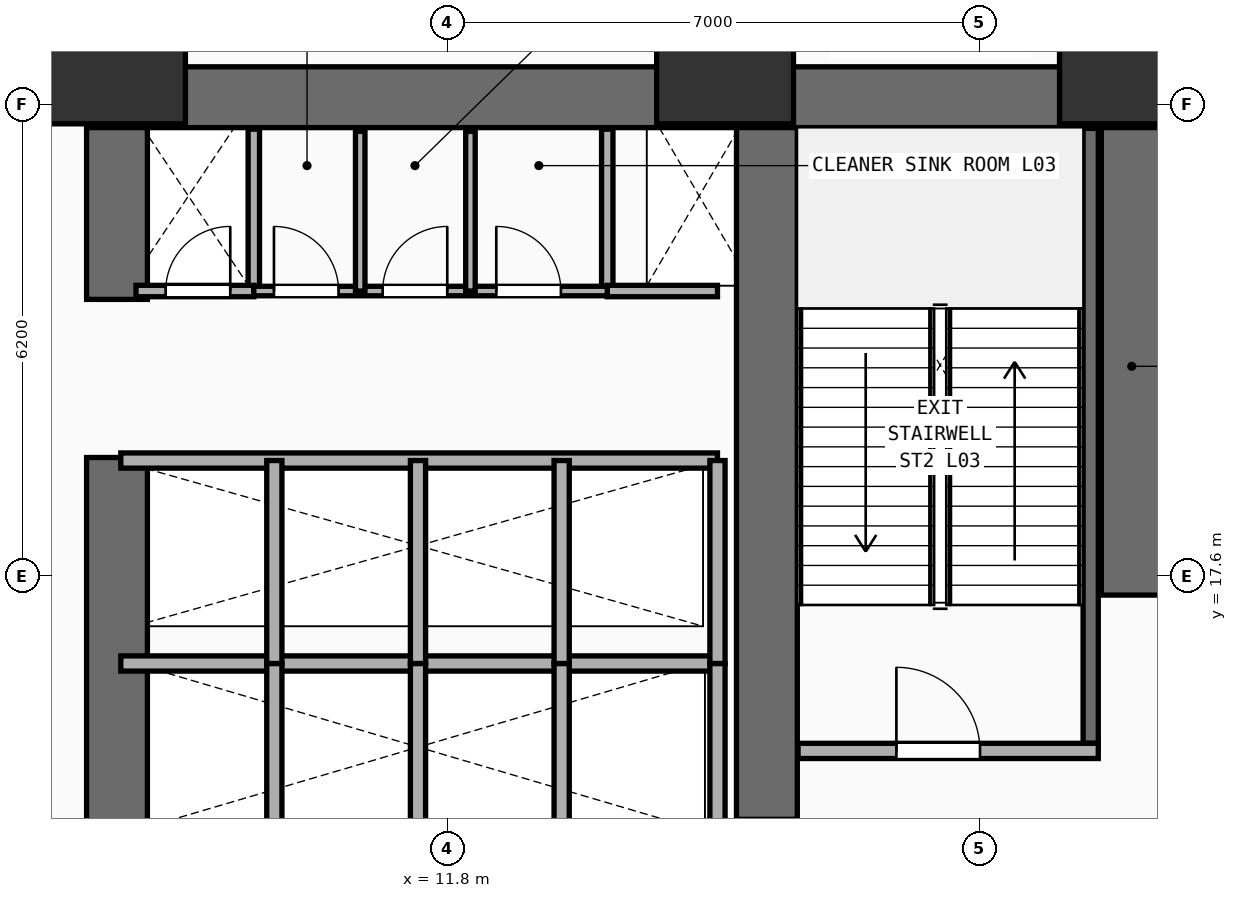
"""IFC4 building model, lengths in metres.
Left out: names, types, materials, properties, quantities, classifications, styles, units other than length and angle.
Written with IfcOpenShell. Run it as: python <this file> out.ifc"""

import sys

from ifc_helpers import new_model, si_unit, direction, frame, frame_2d, origin, origin_2d, place, context, subcontext, project, spatial, rectangle, extrude, element, fill, save


model = new_model("IFC4")
c1 = context("Model", 3, precision=1e-05, world=origin(), true_north=direction((0.0, 1.0)))
c2 = subcontext(c1, "Body", "Model", "MODEL_VIEW")
j1 = project(units=[si_unit("LENGTHUNIT", "METRE"), si_unit("PLANEANGLEUNIT", "RADIAN")], contexts=[c1])
p1 = place(None, origin())
s1 = spatial("IfcSite", under=j1, at=p1, CompositionType="ELEMENT")
p2 = place(p1, origin())
s2 = spatial("IfcBuilding", under=s1, at=p2, CompositionType="ELEMENT")
p3 = place(p2, frame((0.0, 0.0, 10.4)))
s3 = spatial("IfcBuildingStorey", under=s2, at=p3, CompositionType="ELEMENT", Elevation=10.4)
p4 = place(p3, frame((7.05, 23.9, 0.0), z_axis=(0.0, 0.0, 1.0), x_axis=(1.0, 0.0, 0.0)))
e1 = element("IfcWall", 1, at=p4, inside=s3, PredefinedType="SHEAR", context=c2, shape_type="SweptSolid", body=[
    extrude(rectangle(XDim=14.15, YDim=0.8, at=frame_2d((7.075, 0.0))), origin(), (0.0, 0.0, 1.0), 4.46),
])
p5 = place(p3, frame((7.45, 14.35, 0.0), z_axis=(0.0, 0.0, 1.0), x_axis=(0.0, 1.0, 0.0)))
e2 = element("IfcWall", 2, at=p5, inside=s3, PredefinedType="SHEAR", context=c2, shape_type="SweptSolid", body=[
    extrude(rectangle(XDim=4.81, YDim=0.8, at=frame_2d((2.405, 0.0))), origin(), (0.0, 0.0, 1.0), 4.46),
])
p6 = place(p3, frame((7.45, 21.24, 0.0), z_axis=(0.0, 0.0, 1.0), x_axis=(0.0, 1.0, 0.0)))
e3 = element("IfcWall", 3, at=p6, inside=s3, PredefinedType="SHEAR", context=c2, shape_type="SweptSolid", body=[
    extrude(rectangle(XDim=2.26, YDim=0.8, at=frame_2d((1.13, 0.0))), origin(), (0.0, 0.0, 1.0), 4.46),
])
p7 = place(p3, frame((20.8, 17.35, 0.0), z_axis=(0.0, 0.0, 1.0), x_axis=(0.0, 1.0, 0.0)))
e4 = element("IfcWall", 4, at=p7, inside=s3, PredefinedType="SHEAR", context=c2, shape_type="SweptSolid", body=[
    extrude(rectangle(XDim=6.15, YDim=0.8, at=frame_2d((3.075, 0.0))), origin(), (0.0, 0.0, 1.0), 4.46),
])
p8 = place(p3, frame((16.0, 14.4, 0.0), z_axis=(0.0, 0.0, 1.0), x_axis=(0.0, 1.0, 0.0)))
e5 = element("IfcWall", 5, at=p8, inside=s3, PredefinedType="SHEAR", context=c2, shape_type="SweptSolid", body=[
    extrude(rectangle(XDim=9.1, YDim=0.8, at=frame_2d((4.55, 0.0))), origin(), (0.0, 0.0, 1.0), 4.46),
])
for number, where, z_axis, x_axis in (
    (6, (7.45, 24.45, 0.0), (0.0, 0.0, 1.0), (1.0, 0.0, 0.0)),
    (7, (15.45, 24.45, 0.0), (0.0, 0.0, 1.0), (1.0, 0.0, 0.0)),
    (8, (20.75, 24.45, 0.0), (0.0, 0.0, 1.0), (1.0, 0.0, 0.0)),
):
    element("IfcColumn", number, at=place(p3, frame(where, z_axis=z_axis, x_axis=x_axis)), inside=s3, PredefinedType="COLUMN", context=c2, shape_type="SweptSolid", body=[
        extrude(rectangle(XDim=1.8, YDim=1.8, at=origin_2d()), origin(), (0.0, 0.0, 1.0), 4.46),
    ])
p9 = place(p3, frame((20.26, 15.4, 0.0), z_axis=(0.0, 0.0, 1.0), x_axis=(0.0, 1.0, 0.0)))
e9 = element("IfcWall", 9, at=p9, inside=s3, PredefinedType="SHEAR", context=c2, shape_type="SweptSolid", body=[
    extrude(rectangle(XDim=8.09, YDim=0.2, at=frame_2d((4.045, 0.0))), origin(), (0.0, 0.0, 1.0), 4.46),
])
p10 = place(p3, frame((16.41, 15.3, 0.0), z_axis=(0.0, 0.0, 1.0), x_axis=(1.0, 0.0, 0.0)))
e10 = element("IfcWall", 10, at=p10, inside=s3, PredefinedType="PARTITIONING", context=c2, shape_type="SweptSolid", body=[
    extrude(rectangle(XDim=3.95, YDim=0.2, at=frame_2d((1.975, 0.0))), origin(), (0.0, 0.0, 1.0), 4.46),
])
p11 = place(p10, frame((1.294, 0.0, 0.0)))
e11 = element("IfcOpeningElement", 11, at=p11, cuts=e10, PredefinedType="OPENING", context=c2, shape_type="SweptSolid", body=[
    extrude(rectangle(XDim=1.1, YDim=2.2, at=frame_2d((0.55, 1.1))), frame((0.0, 0.11, 0.0), z_axis=(0.0, -1.0, 0.0), x_axis=(1.0, 0.0, 0.0)), (0.0, 0.0, 1.0), 0.22),
])
p12 = place(p3, frame((7.5, 16.45, 0.0), z_axis=(0.0, 0.0, 1.0), x_axis=(1.0, 0.0, 0.0)))
e12 = element("IfcWall", 12, at=p12, inside=s3, PredefinedType="PARTITIONING", context=c2, shape_type="SweptSolid", body=[
    extrude(rectangle(XDim=7.85, YDim=0.2, at=frame_2d((3.925, 0.0))), origin(), (0.0, 0.0, 1.0), 4.46),
])
for number, where, z_axis, x_axis in (
    (13, (15.35, 14.22, 0.0), (0.0, 0.0, 1.0), (0.0, 1.0, 0.0)),
    (14, (9.52, 14.22, 0.0), (0.0, 0.0, 1.0), (0.0, 1.0, 0.0)),
    (15, (11.41, 14.22, 0.0), (0.0, 0.0, 1.0), (0.0, 1.0, 0.0)),
    (16, (13.3, 14.22, 0.0), (0.0, 0.0, 1.0), (0.0, 1.0, 0.0)),
):
    element("IfcWall", number, at=place(p3, frame(where, z_axis=z_axis, x_axis=x_axis)), inside=s3, PredefinedType="PARTITIONING", context=c2, shape_type="SweptSolid", body=[
        extrude(rectangle(XDim=2.23, YDim=0.2, at=frame_2d((1.115, 0.0))), origin(), (0.0, 0.0, 1.0), 4.46),
    ])
p13 = place(p3, frame((7.5, 19.12, 0.0), z_axis=(0.0, 0.0, 1.0), x_axis=(1.0, 0.0, 0.0)))
e17 = element("IfcWall", 17, at=p13, inside=s3, PredefinedType="PARTITIONING", context=c2, shape_type="SweptSolid", body=[
    extrude(rectangle(XDim=7.85, YDim=0.2, at=frame_2d((3.925, 0.0))), origin(), (0.0, 0.0, 1.0), 4.46),
])
for number, where, z_axis, x_axis in (
    (18, (15.35, 16.45, 0.0), (0.0, 0.0, 1.0), (0.0, 1.0, 0.0)),
    (19, (9.52, 16.45, 0.0), (0.0, 0.0, 1.0), (0.0, 1.0, 0.0)),
    (20, (11.41, 16.45, 0.0), (0.0, 0.0, 1.0), (0.0, 1.0, 0.0)),
    (21, (13.3, 16.45, 0.0), (0.0, 0.0, 1.0), (0.0, 1.0, 0.0)),
):
    element("IfcWall", number, at=place(p3, frame(where, z_axis=z_axis, x_axis=x_axis)), inside=s3, PredefinedType="PARTITIONING", context=c2, shape_type="SweptSolid", body=[
        extrude(rectangle(XDim=2.67, YDim=0.2, at=frame_2d((1.335, 0.0))), origin(), (0.0, 0.0, 1.0), 4.46),
    ])
for number, where, z_axis, x_axis in (
    (22, (9.25, 21.35, 0.0), (0.0, 0.0, 1.0), (0.0, 1.0, 0.0)),
    (23, (13.9, 21.35, 0.0), (0.0, 0.0, 1.0), (0.0, 1.0, 0.0)),
):
    element("IfcWall", number, at=place(p3, frame(where, z_axis=z_axis, x_axis=x_axis)), inside=s3, PredefinedType="PARTITIONING", context=c2, shape_type="SweptSolid", body=[
        extrude(rectangle(XDim=2.13, YDim=0.15, at=frame_2d((1.065, 0.0))), origin(), (0.0, 0.0, 1.0), 4.46),
    ])
p14 = place(p3, frame((7.7, 21.35, 0.0), z_axis=(0.0, 0.0, 1.0), x_axis=(1.0, 0.0, 0.0)))
e24 = element("IfcWall", 24, at=p14, inside=s3, PredefinedType="PARTITIONING", context=c2, shape_type="SweptSolid", body=[
    extrude(rectangle(XDim=1.55, YDim=0.15, at=frame_2d((0.775, 0.0))), origin(), (0.0, 0.0, 1.0), 4.46),
])
p15 = place(p14, frame((0.39, 0.0, 0.0)))
e25 = element("IfcOpeningElement", 25, at=p15, cuts=e24, PredefinedType="OPENING", context=c2, shape_type="SweptSolid", body=[
    extrude(rectangle(XDim=0.85, YDim=2.15, at=frame_2d((0.425, 1.075))), frame((0.0, 0.085, 0.0), z_axis=(0.0, -1.0, 0.0), x_axis=(1.0, 0.0, 0.0)), (0.0, 0.0, 1.0), 0.17),
])
p16 = place(p3, frame((13.9, 21.35, 0.0), z_axis=(0.0, 0.0, 1.0), x_axis=(1.0, 0.0, 0.0)))
e26 = element("IfcWall", 26, at=p16, inside=s3, PredefinedType="PARTITIONING", context=c2, shape_type="SweptSolid", body=[
    extrude(rectangle(XDim=1.45, YDim=0.15, at=frame_2d((0.725, 0.0))), origin(), (0.0, 0.0, 1.0), 4.46),
])
p17 = place(p3, frame((9.25, 21.35, 0.0), z_axis=(0.0, 0.0, 1.0), x_axis=(1.0, 0.0, 0.0)))
e27 = element("IfcWall", 27, at=p17, inside=s3, PredefinedType="PARTITIONING", context=c2, shape_type="SweptSolid", body=[
    extrude(rectangle(XDim=4.65, YDim=0.125, at=frame_2d((2.325, 0.0))), origin(), (0.0, 0.0, 1.0), 4.46),
])
p18 = place(p17, frame((0.265, 0.0, 0.0)))
e28 = element("IfcOpeningElement", 28, at=p18, cuts=e27, PredefinedType="OPENING", context=c2, shape_type="SweptSolid", body=[
    extrude(rectangle(XDim=0.85, YDim=2.15, at=frame_2d((0.425, 1.075))), frame((0.0, 0.073, 0.0), z_axis=(0.0, -1.0, 0.0), x_axis=(1.0, 0.0, 0.0)), (0.0, 0.0, 1.0), 0.145),
])
p19 = place(p17, frame((1.695, 0.0, 0.0)))
e29 = element("IfcOpeningElement", 29, at=p19, cuts=e27, PredefinedType="OPENING", context=c2, shape_type="SweptSolid", body=[
    extrude(rectangle(XDim=0.85, YDim=2.15, at=frame_2d((0.425, 1.075))), frame((0.0, 0.073, 0.0), z_axis=(0.0, -1.0, 0.0), x_axis=(1.0, 0.0, 0.0)), (0.0, 0.0, 1.0), 0.145),
])
p20 = place(p17, frame((3.19, 0.0, 0.0)))
e30 = element("IfcOpeningElement", 30, at=p20, cuts=e27, PredefinedType="OPENING", context=c2, shape_type="SweptSolid", body=[
    extrude(rectangle(XDim=0.85, YDim=2.15, at=frame_2d((0.425, 1.075))), frame((0.0, 0.073, 0.0), z_axis=(0.0, -1.0, 0.0), x_axis=(1.0, 0.0, 0.0)), (0.0, 0.0, 1.0), 0.145),
])
for number, where, z_axis, x_axis in (
    (31, (10.65, 21.35, 0.0), (0.0, 0.0, 1.0), (0.0, 1.0, 0.0)),
    (32, (12.1, 21.35, 0.0), (0.0, 0.0, 1.0), (0.0, 1.0, 0.0)),
):
    element("IfcWall", number, at=place(p3, frame(where, z_axis=z_axis, x_axis=x_axis)), inside=s3, PredefinedType="PARTITIONING", context=c2, shape_type="SweptSolid", body=[
        extrude(rectangle(XDim=2.1, YDim=0.125, at=frame_2d((1.05, 0.0))), origin(), (0.0, 0.0, 1.0), 4.46),
    ])
p21 = place(p11, origin())
e33 = element("IfcDoor", 33, at=p21, inside=s3, OperationType="SINGLE_SWING_LEFT", PredefinedType="DOOR", context=c2, shape_type="SweptSolid", body=[
    extrude(rectangle(XDim=1.1, YDim=2.2, at=frame_2d((0.55, 1.1))), frame((0.0, 0.025, 0.0), z_axis=(0.0, -1.0, 0.0), x_axis=(1.0, 0.0, 0.0)), (0.0, 0.0, 1.0), 0.05),
])
fill(e11, e33)
p22 = place(p15, origin())
e34 = element("IfcDoor", 34, at=p22, inside=s3, OperationType="SINGLE_SWING_RIGHT", PredefinedType="DOOR", context=c2, shape_type="SweptSolid", body=[
    extrude(rectangle(XDim=0.85, YDim=2.15, at=frame_2d((0.425, 1.075))), frame((0.0, 0.025, 0.0), z_axis=(0.0, -1.0, 0.0), x_axis=(1.0, 0.0, 0.0)), (0.0, 0.0, 1.0), 0.05),
])
fill(e25, e34)
p23 = place(p18, origin())
e35 = element("IfcDoor", 35, at=p23, inside=s3, OperationType="SINGLE_SWING_LEFT", PredefinedType="DOOR", context=c2, shape_type="SweptSolid", body=[
    extrude(rectangle(XDim=0.85, YDim=2.15, at=frame_2d((0.425, 1.075))), frame((0.0, 0.025, 0.0), z_axis=(0.0, -1.0, 0.0), x_axis=(1.0, 0.0, 0.0)), (0.0, 0.0, 1.0), 0.05),
])
fill(e28, e35)
p24 = place(p19, origin())
e36 = element("IfcDoor", 36, at=p24, inside=s3, OperationType="SINGLE_SWING_RIGHT", PredefinedType="DOOR", context=c2, shape_type="SweptSolid", body=[
    extrude(rectangle(XDim=0.85, YDim=2.15, at=frame_2d((0.425, 1.075))), frame((0.0, 0.025, 0.0), z_axis=(0.0, -1.0, 0.0), x_axis=(1.0, 0.0, 0.0)), (0.0, 0.0, 1.0), 0.05),
])
fill(e29, e36)
p25 = place(p20, origin())
e37 = element("IfcDoor", 37, at=p25, inside=s3, OperationType="SINGLE_SWING_LEFT", PredefinedType="DOOR", context=c2, shape_type="SweptSolid", body=[
    extrude(rectangle(XDim=0.85, YDim=2.15, at=frame_2d((0.425, 1.075))), frame((0.0, 0.025, 0.0), z_axis=(0.0, -1.0, 0.0), x_axis=(1.0, 0.0, 0.0)), (0.0, 0.0, 1.0), 0.05),
])
fill(e30, e37)
save(model, sys.argv[1])
